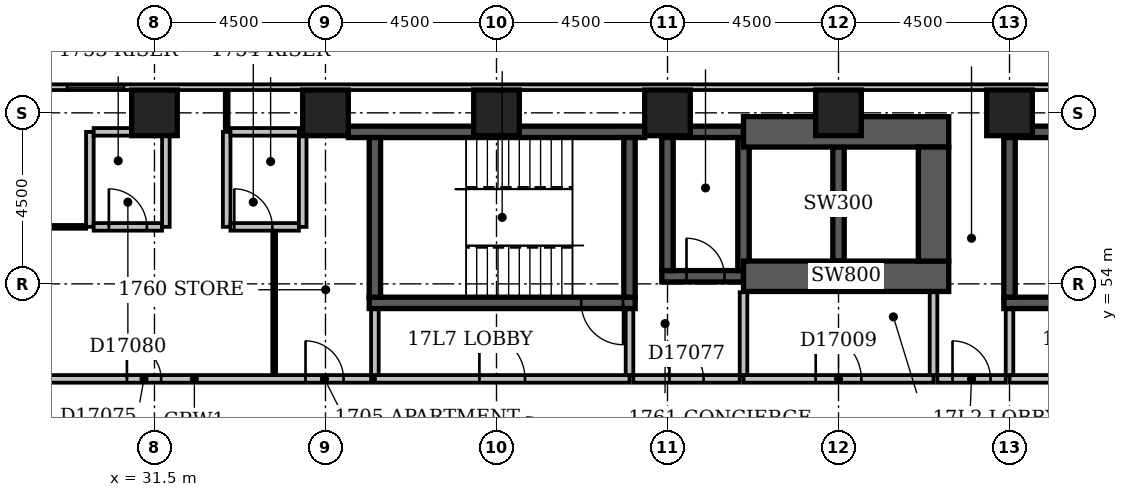
"""IFC4 building model, lengths in metres.
Left out: names, types, materials, properties, quantities, classifications, styles, units other than length and angle.
Written with IfcOpenShell. Run it as: python <this file> out.ifc"""

import sys

from ifc_helpers import new_model, si_unit, direction, frame, frame_2d, origin, origin_2d, place, context, subcontext, project, spatial, rectangle, extrude, element, fill, save


model = new_model("IFC4")
c1 = context("Model", 3, precision=1e-05, world=origin(), true_north=direction((0.0, 1.0)))
c2 = subcontext(c1, "Body", "Model", "MODEL_VIEW")
j1 = project(units=[si_unit("LENGTHUNIT", "METRE"), si_unit("PLANEANGLEUNIT", "RADIAN")], contexts=[c1])
p1 = place(None, origin())
s1 = spatial("IfcSite", under=j1, at=p1, CompositionType="ELEMENT")
p2 = place(p1, origin())
s2 = spatial("IfcBuilding", under=s1, at=p2, CompositionType="ELEMENT")
p3 = place(p2, frame((0.0, 0.0, 72.2)))
s3 = spatial("IfcBuildingStorey", under=s2, at=p3, CompositionType="ELEMENT", Elevation=72.2)
p4 = place(p3, frame((36.6, 58.0, -0.3), z_axis=(0.0, 0.0, 1.0), x_axis=(1.0, 0.0, 0.0)))
e1 = element("IfcWall", 1, at=p4, inside=s3, PredefinedType="SHEAR", context=c2, shape_type="SweptSolid", body=[
    extrude(rectangle(XDim=7.8, YDim=0.3, at=frame_2d((3.9, 0.0))), origin(), (0.0, 0.0, 1.0), 3.6),
])
p5 = place(p3, frame((37.15, 53.5, -0.3), z_axis=(0.0, 0.0, 1.0), x_axis=(1.0, 0.0, 0.0)))
e2 = element("IfcWall", 2, at=p5, inside=s3, PredefinedType="SHEAR", context=c2, shape_type="SweptSolid", body=[
    extrude(rectangle(XDim=7.0, YDim=0.3, at=frame_2d((3.5, 0.0))), origin(), (0.0, 0.0, 1.0), 3.6),
])
p6 = place(p5, frame((5.58, 0.0, 0.3)))
e3 = element("IfcOpeningElement", 3, at=p6, cuts=e2, PredefinedType="OPENING", context=c2, shape_type="SweptSolid", body=[
    extrude(rectangle(XDim=1.1, YDim=2.1, at=frame_2d((0.55, 1.05))), frame((0.0, 0.162, 0.0), z_axis=(0.0, -1.0, 0.0), x_axis=(1.0, 0.0, 0.0)), (0.0, 0.0, 1.0), 0.324),
])
for number, where, z_axis, x_axis in (
    (4, (37.3, 53.65, -0.3), (0.0, 0.0, 1.0), (0.0, 1.0, 0.0)),
    (5, (44.0, 53.65, -0.3), (0.0, 0.0, 1.0), (0.0, 1.0, 0.0)),
):
    element("IfcWall", number, at=place(p3, frame(where, z_axis=z_axis, x_axis=x_axis)), inside=s3, PredefinedType="SHEAR", context=c2, shape_type="SweptSolid", body=[
        extrude(rectangle(XDim=4.2, YDim=0.3, at=frame_2d((2.1, 0.0))), origin(), (0.0, 0.0, 1.0), 3.6),
    ])
p7 = place(p3, frame((44.85, 54.2, -0.3), z_axis=(0.0, 0.0, 1.0), x_axis=(1.0, 0.0, 0.0)))
e6 = element("IfcWall", 6, at=p7, inside=s3, PredefinedType="SHEAR", context=c2, shape_type="SweptSolid", body=[
    extrude(rectangle(XDim=2.15, YDim=0.3, at=frame_2d((1.075, 0.0))), origin(), (0.0, 0.0, 1.0), 3.6),
])
p8 = place(p7, frame((0.65, 0.0, 0.3)))
e7 = element("IfcOpeningElement", 7, at=p8, cuts=e6, PredefinedType="OPENING", context=c2, shape_type="SweptSolid", body=[
    extrude(rectangle(XDim=1.0, YDim=2.1, at=frame_2d((0.5, 1.05))), frame((0.0, 0.162, 0.0), z_axis=(0.0, -1.0, 0.0), x_axis=(1.0, 0.0, 0.0)), (0.0, 0.0, 1.0), 0.324),
])
p9 = place(p3, frame((44.85, 58.0, -0.3), z_axis=(0.0, 0.0, 1.0), x_axis=(1.0, 0.0, 0.0)))
e8 = element("IfcWall", 8, at=p9, inside=s3, PredefinedType="SHEAR", context=c2, shape_type="SweptSolid", body=[
    extrude(rectangle(XDim=2.15, YDim=0.3, at=frame_2d((1.075, 0.0))), origin(), (0.0, 0.0, 1.0), 3.6),
])
p10 = place(p3, frame((45.0, 54.35, -0.3), z_axis=(0.0, 0.0, 1.0), x_axis=(0.0, 1.0, 0.0)))
e9 = element("IfcWall", 9, at=p10, inside=s3, PredefinedType="SHEAR", context=c2, shape_type="SweptSolid", body=[
    extrude(rectangle(XDim=3.5, YDim=0.3, at=frame_2d((1.75, 0.0))), origin(), (0.0, 0.0, 1.0), 3.6),
])
p11 = place(p3, frame((47.0, 54.2, -0.3), z_axis=(0.0, 0.0, 1.0), x_axis=(1.0, 0.0, 0.0)))
e10 = element("IfcWall", 10, at=p11, inside=s3, PredefinedType="SHEAR", context=c2, shape_type="SweptSolid", body=[
    extrude(rectangle(XDim=5.4, YDim=0.8, at=frame_2d((2.7, 0.0))), origin(), (0.0, 0.0, 1.0), 3.6),
])
p12 = place(p3, frame((47.0, 54.35, -0.3), z_axis=(0.0, 0.0, 1.0), x_axis=(0.0, 1.0, 0.0)))
e11 = element("IfcWall", 11, at=p12, inside=s3, PredefinedType="SHEAR", context=c2, shape_type="SweptSolid", body=[
    extrude(rectangle(XDim=3.5, YDim=0.3, at=frame_2d((1.75, 0.0))), origin(), (0.0, 0.0, 1.0), 3.6),
])
p13 = place(p3, frame((47.0, 58.0, -0.3), z_axis=(0.0, 0.0, 1.0), x_axis=(1.0, 0.0, 0.0)))
e12 = element("IfcWall", 12, at=p13, inside=s3, PredefinedType="SHEAR", context=c2, shape_type="SweptSolid", body=[
    extrude(rectangle(XDim=5.4, YDim=0.8, at=frame_2d((2.7, 0.0))), origin(), (0.0, 0.0, 1.0), 3.6),
])
p14 = place(p3, frame((49.5, 54.6, -0.3), z_axis=(0.0, 0.0, 1.0), x_axis=(0.0, 1.0, 0.0)))
e13 = element("IfcWall", 13, at=p14, inside=s3, PredefinedType="SHEAR", context=c2, shape_type="SweptSolid", body=[
    extrude(rectangle(XDim=3.0, YDim=0.3, at=frame_2d((1.5, 0.0))), origin(), (0.0, 0.0, 1.0), 3.6),
])
p15 = place(p3, frame((52.0, 54.6, -0.3), z_axis=(0.0, 0.0, 1.0), x_axis=(0.0, 1.0, 0.0)))
e14 = element("IfcWall", 14, at=p15, inside=s3, PredefinedType="SHEAR", context=c2, shape_type="SweptSolid", body=[
    extrude(rectangle(XDim=3.0, YDim=0.8, at=frame_2d((1.5, 0.0))), origin(), (0.0, 0.0, 1.0), 3.6),
])
p16 = place(p3, frame((53.85, 53.5, -0.3), z_axis=(0.0, 0.0, 1.0), x_axis=(1.0, 0.0, 0.0)))
e15 = element("IfcWall", 15, at=p16, inside=s3, PredefinedType="SHEAR", context=c2, shape_type="SweptSolid", body=[
    extrude(rectangle(XDim=7.0, YDim=0.3, at=frame_2d((3.5, 0.0))), origin(), (0.0, 0.0, 1.0), 3.6),
])
p17 = place(p16, frame((5.58, 0.0, 0.3)))
e16 = element("IfcOpeningElement", 16, at=p17, cuts=e15, PredefinedType="OPENING", context=c2, shape_type="SweptSolid", body=[
    extrude(rectangle(XDim=1.1, YDim=2.1, at=frame_2d((0.55, 1.05))), frame((0.0, 0.162, 0.0), z_axis=(0.0, -1.0, 0.0), x_axis=(1.0, 0.0, 0.0)), (0.0, 0.0, 1.0), 0.324),
])
p18 = place(p3, frame((53.85, 58.0, -0.3), z_axis=(0.0, 0.0, 1.0), x_axis=(1.0, 0.0, 0.0)))
e17 = element("IfcWall", 17, at=p18, inside=s3, PredefinedType="SHEAR", context=c2, shape_type="SweptSolid", body=[
    extrude(rectangle(XDim=7.0, YDim=0.3, at=frame_2d((3.5, 0.0))), origin(), (0.0, 0.0, 1.0), 3.6),
])
p19 = place(p3, frame((54.0, 53.65, -0.3), z_axis=(0.0, 0.0, 1.0), x_axis=(0.0, 1.0, 0.0)))
e18 = element("IfcWall", 18, at=p19, inside=s3, PredefinedType="SHEAR", context=c2, shape_type="SweptSolid", body=[
    extrude(rectangle(XDim=4.2, YDim=0.3, at=frame_2d((2.1, 0.0))), origin(), (0.0, 0.0, 1.0), 3.6),
])
for number, where, z_axis, x_axis in (
    (19, (31.5, 58.5, -0.3), (0.0, 0.0, 1.0), (1.0, 0.0, 0.0)),
    (20, (36.0, 58.5, -0.3), (0.0, 0.0, 1.0), (1.0, 0.0, 0.0)),
    (21, (40.5, 58.5, -0.3), (0.0, 0.0, 1.0), (1.0, 0.0, 0.0)),
    (22, (45.0, 58.5, -0.3), (0.0, 0.0, 1.0), (1.0, 0.0, 0.0)),
    (23, (49.5, 58.5, -0.3), (0.0, 0.0, 1.0), (1.0, 0.0, 0.0)),
    (24, (54.0, 58.5, -0.3), (0.0, 0.0, 1.0), (1.0, 0.0, 0.0)),
):
    element("IfcColumn", number, at=place(p3, frame(where, z_axis=z_axis, x_axis=x_axis)), inside=s3, PredefinedType="COLUMN", context=c2, shape_type="SweptSolid", body=[
        extrude(rectangle(XDim=1.2, YDim=1.2, at=origin_2d()), origin(), (0.0, 0.0, 1.0), 3.6),
    ])
p20 = place(p3, frame((68.1, 59.175, 0.0), z_axis=(0.0, 0.0, 1.0), x_axis=(-1.0, 0.0, 0.0)))
e25 = element("IfcWall", 25, at=p20, inside=s3, PredefinedType="STANDARD", context=c2, shape_type="SweptSolid", body=[
    extrude(rectangle(XDim=68.85, YDim=0.15, at=frame_2d((34.425, 0.0))), origin(), (0.0, 0.0, 1.0), 2.7),
])
p21 = place(p20, frame((1.65, 0.0, 0.6)))
e26 = element("IfcOpeningElement", 26, at=p21, cuts=e25, PredefinedType="OPENING", context=c2, shape_type="SweptSolid", body=[
    extrude(rectangle(XDim=2.4, YDim=1.8, at=frame_2d((1.2, 0.9))), frame((0.0, 0.087, 0.0), z_axis=(0.0, -1.0, 0.0), x_axis=(1.0, 0.0, 0.0)), (0.0, 0.0, 1.0), 0.174),
])
p22 = place(p20, frame((6.15, 0.0, 0.6)))
e27 = element("IfcOpeningElement", 27, at=p22, cuts=e25, PredefinedType="OPENING", context=c2, shape_type="SweptSolid", body=[
    extrude(rectangle(XDim=2.4, YDim=1.8, at=frame_2d((1.2, 0.9))), frame((0.0, 0.087, 0.0), z_axis=(0.0, -1.0, 0.0), x_axis=(1.0, 0.0, 0.0)), (0.0, 0.0, 1.0), 0.174),
])
p23 = place(p20, frame((37.403, 0.0, 0.6)))
e28 = element("IfcOpeningElement", 28, at=p23, cuts=e25, PredefinedType="OPENING", context=c2, shape_type="SweptSolid", body=[
    extrude(rectangle(XDim=1.5, YDim=1.8, at=frame_2d((0.75, 0.9))), frame((0.0, 0.087, 0.0), z_axis=(0.0, -1.0, 0.0), x_axis=(1.0, 0.0, 0.0)), (0.0, 0.0, 1.0), 0.174),
])
p24 = place(p3, frame((47.0, 51.5, 0.0), z_axis=(0.0, 0.0, 1.0), x_axis=(1.0, 0.0, 0.0)))
e29 = element("IfcWall", 29, at=p24, inside=s3, PredefinedType="PARTITIONING", context=c2, shape_type="SweptSolid", body=[
    extrude(rectangle(XDim=5.0, YDim=0.2, at=frame_2d((2.5, 0.0))), origin(), (0.0, 0.0, 1.0), 3.3),
])
p25 = place(p24, frame((1.9, 0.0, 0.0)))
e30 = element("IfcOpeningElement", 30, at=p25, cuts=e29, PredefinedType="OPENING", context=c2, shape_type="SweptSolid", body=[
    extrude(rectangle(XDim=1.2, YDim=2.1, at=frame_2d((0.6, 1.05))), frame((0.0, 0.112, 0.0), z_axis=(0.0, -1.0, 0.0), x_axis=(1.0, 0.0, 0.0)), (0.0, 0.0, 1.0), 0.224),
])
for number, where, z_axis, x_axis in (
    (31, (52.0, 51.6, 0.0), (0.0, 0.0, 1.0), (0.0, 1.0, 0.0)),
    (32, (47.0, 51.6, 0.0), (0.0, 0.0, 1.0), (0.0, 1.0, 0.0)),
):
    element("IfcWall", number, at=place(p3, frame(where, z_axis=z_axis, x_axis=x_axis)), inside=s3, PredefinedType="PARTITIONING", context=c2, shape_type="SweptSolid", body=[
        extrude(rectangle(XDim=2.18, YDim=0.2, at=frame_2d((1.09, 0.0))), origin(), (0.0, 0.0, 1.0), 3.3),
    ])
p26 = place(p3, frame((37.3, 51.5, 0.0), z_axis=(0.0, 0.0, 1.0), x_axis=(1.0, 0.0, 0.0)))
e33 = element("IfcWall", 33, at=p26, inside=s3, PredefinedType="PARTITIONING", context=c2, shape_type="SweptSolid", body=[
    extrude(rectangle(XDim=6.7, YDim=0.2, at=frame_2d((3.35, 0.0))), origin(), (0.0, 0.0, 1.0), 3.3),
])
p27 = place(p26, frame((2.75, 0.0, 0.0)))
e34 = element("IfcOpeningElement", 34, at=p27, cuts=e33, PredefinedType="OPENING", context=c2, shape_type="SweptSolid", body=[
    extrude(rectangle(XDim=1.2, YDim=2.1, at=frame_2d((0.6, 1.05))), frame((0.0, 0.112, 0.0), z_axis=(0.0, -1.0, 0.0), x_axis=(1.0, 0.0, 0.0)), (0.0, 0.0, 1.0), 0.224),
])
for number, where, z_axis, x_axis in (
    (35, (44.0, 51.6, 0.0), (0.0, 0.0, 1.0), (0.0, 1.0, 0.0)),
    (36, (37.3, 51.6, 0.0), (0.0, 0.0, 1.0), (0.0, 1.0, 0.0)),
):
    element("IfcWall", number, at=place(p3, frame(where, z_axis=z_axis, x_axis=x_axis)), inside=s3, PredefinedType="PARTITIONING", context=c2, shape_type="SweptSolid", body=[
        extrude(rectangle(XDim=1.73, YDim=0.2, at=frame_2d((0.865, 0.0))), origin(), (0.0, 0.0, 1.0), 3.3),
    ])
p28 = place(p3, frame((54.0, 51.5, 0.0), z_axis=(0.0, 0.0, 1.0), x_axis=(1.0, 0.0, 0.0)))
e37 = element("IfcWall", 37, at=p28, inside=s3, PredefinedType="PARTITIONING", context=c2, shape_type="SweptSolid", body=[
    extrude(rectangle(XDim=6.7, YDim=0.2, at=frame_2d((3.35, 0.0))), origin(), (0.0, 0.0, 1.0), 3.3),
])
p29 = place(p28, frame((2.75, 0.0, 0.0)))
e38 = element("IfcOpeningElement", 38, at=p29, cuts=e37, PredefinedType="OPENING", context=c2, shape_type="SweptSolid", body=[
    extrude(rectangle(XDim=1.2, YDim=2.1, at=frame_2d((0.6, 1.05))), frame((0.0, 0.112, 0.0), z_axis=(0.0, -1.0, 0.0), x_axis=(1.0, 0.0, 0.0)), (0.0, 0.0, 1.0), 0.224),
])
p30 = place(p3, frame((54.0, 51.6, 0.0), z_axis=(0.0, 0.0, 1.0), x_axis=(0.0, 1.0, 0.0)))
e39 = element("IfcWall", 39, at=p30, inside=s3, PredefinedType="PARTITIONING", context=c2, shape_type="SweptSolid", body=[
    extrude(rectangle(XDim=1.73, YDim=0.2, at=frame_2d((0.865, 0.0))), origin(), (0.0, 0.0, 1.0), 2.6),
])
p31 = place(p3, frame((27.9, 51.5, 0.0), z_axis=(0.0, 0.0, 1.0), x_axis=(1.0, 0.0, 0.0)))
e40 = element("IfcWall", 40, at=p31, inside=s3, PredefinedType="PARTITIONING", context=c2, shape_type="SweptSolid", body=[
    extrude(rectangle(XDim=9.3, YDim=0.2, at=frame_2d((4.65, 0.0))), origin(), (0.0, 0.0, 1.0), 3.3),
])
p32 = place(p31, frame((2.875, 0.0, 0.0)))
e41 = element("IfcOpeningElement", 41, at=p32, cuts=e40, PredefinedType="OPENING", context=c2, shape_type="SweptSolid", body=[
    extrude(rectangle(XDim=0.9, YDim=2.1, at=frame_2d((0.45, 1.05))), frame((0.0, 0.112, 0.0), z_axis=(0.0, -1.0, 0.0), x_axis=(1.0, 0.0, 0.0)), (0.0, 0.0, 1.0), 0.224),
])
p33 = place(p31, frame((7.575, 0.0, 0.0)))
e42 = element("IfcOpeningElement", 42, at=p33, cuts=e40, PredefinedType="OPENING", context=c2, shape_type="SweptSolid", body=[
    extrude(rectangle(XDim=1.0, YDim=2.1, at=frame_2d((0.5, 1.05))), frame((0.0, 0.112, 0.0), z_axis=(0.0, -1.0, 0.0), x_axis=(1.0, 0.0, 0.0)), (0.0, 0.0, 1.0), 0.224),
])
p34 = place(p3, frame((44.1, 51.5, 0.0), z_axis=(0.0, 0.0, 1.0), x_axis=(1.0, 0.0, 0.0)))
e43 = element("IfcWall", 43, at=p34, inside=s3, PredefinedType="PARTITIONING", context=c2, shape_type="SweptSolid", body=[
    extrude(rectangle(XDim=2.8, YDim=0.2, at=frame_2d((1.4, 0.0))), origin(), (0.0, 0.0, 1.0), 3.3),
])
p35 = place(p34, frame((0.95, 0.0, 0.0)))
e44 = element("IfcOpeningElement", 44, at=p35, cuts=e43, PredefinedType="OPENING", context=c2, shape_type="SweptSolid", body=[
    extrude(rectangle(XDim=0.9, YDim=2.1, at=frame_2d((0.45, 1.05))), frame((0.0, 0.112, 0.0), z_axis=(0.0, -1.0, 0.0), x_axis=(1.0, 0.0, 0.0)), (0.0, 0.0, 1.0), 0.224),
])
p36 = place(p3, frame((52.1, 51.5, 0.0), z_axis=(0.0, 0.0, 1.0), x_axis=(1.0, 0.0, 0.0)))
e45 = element("IfcWall", 45, at=p36, inside=s3, PredefinedType="PARTITIONING", context=c2, shape_type="SweptSolid", body=[
    extrude(rectangle(XDim=1.8, YDim=0.2, at=frame_2d((0.9, 0.0))), origin(), (0.0, 0.0, 1.0), 3.3),
])
p37 = place(p36, frame((0.4, 0.0, 0.0)))
e46 = element("IfcOpeningElement", 46, at=p37, cuts=e45, PredefinedType="OPENING", context=c2, shape_type="SweptSolid", body=[
    extrude(rectangle(XDim=1.0, YDim=2.1, at=frame_2d((0.5, 1.05))), frame((0.0, 0.112, 0.0), z_axis=(0.0, -1.0, 0.0), x_axis=(1.0, 0.0, 0.0)), (0.0, 0.0, 1.0), 0.224),
])
p38 = place(p3, frame((34.65, 51.6, 0.0), z_axis=(0.0, 0.0, 1.0), x_axis=(0.0, 1.0, 0.0)))
e47 = element("IfcWall", 47, at=p38, inside=s3, PredefinedType="PARTITIONING", context=c2, shape_type="SweptSolid", body=[
    extrude(rectangle(XDim=3.8, YDim=0.1, at=frame_2d((1.9, 0.0))), origin(), (0.0, 0.0, 1.0), 3.3),
])
p39 = place(p3, frame((27.95, 55.5, 0.0), z_axis=(0.0, 0.0, 1.0), x_axis=(1.0, 0.0, 0.0)))
e48 = element("IfcWall", 48, at=p39, inside=s3, PredefinedType="PARTITIONING", context=c2, shape_type="SweptSolid", body=[
    extrude(rectangle(XDim=1.75, YDim=0.1, at=frame_2d((0.875, 0.0))), origin(), (0.0, 0.0, 1.0), 3.3),
])
p40 = place(p3, frame((29.8, 55.5, 0.0), z_axis=(0.0, 0.0, 1.0), x_axis=(0.0, 1.0, 0.0)))
e49 = element("IfcWall", 49, at=p40, inside=s3, PredefinedType="PARTITIONING", context=c2, shape_type="SweptSolid", body=[
    extrude(rectangle(XDim=2.5, YDim=0.2, at=frame_2d((1.25, 0.0))), origin(), (0.0, 0.0, 1.0), 3.3),
])
p41 = place(p3, frame((29.9, 55.5, 0.0), z_axis=(0.0, 0.0, 1.0), x_axis=(1.0, 0.0, 0.0)))
e50 = element("IfcWall", 50, at=p41, inside=s3, PredefinedType="PARTITIONING", context=c2, shape_type="SweptSolid", body=[
    extrude(rectangle(XDim=1.8, YDim=0.2, at=frame_2d((0.9, 0.0))), origin(), (0.0, 0.0, 1.0), 3.3),
])
p42 = place(p41, frame((0.4, 0.0, 0.0)))
e51 = element("IfcOpeningElement", 51, at=p42, cuts=e50, PredefinedType="OPENING", context=c2, shape_type="SweptSolid", body=[
    extrude(rectangle(XDim=1.0, YDim=2.1, at=frame_2d((0.5, 1.05))), frame((0.0, 0.112, 0.0), z_axis=(0.0, -1.0, 0.0), x_axis=(1.0, 0.0, 0.0)), (0.0, 0.0, 1.0), 0.224),
])
for number, where, z_axis, x_axis in (
    (52, (31.8, 55.5, 0.0), (0.0, 0.0, 1.0), (0.0, 1.0, 0.0)),
    (53, (33.4, 55.5, 0.0), (0.0, 0.0, 1.0), (0.0, 1.0, 0.0)),
):
    element("IfcWall", number, at=place(p3, frame(where, z_axis=z_axis, x_axis=x_axis)), inside=s3, PredefinedType="PARTITIONING", context=c2, shape_type="SweptSolid", body=[
        extrude(rectangle(XDim=2.5, YDim=0.2, at=frame_2d((1.25, 0.0))), origin(), (0.0, 0.0, 1.0), 3.3),
    ])
p43 = place(p3, frame((33.5, 55.5, 0.0), z_axis=(0.0, 0.0, 1.0), x_axis=(1.0, 0.0, 0.0)))
e54 = element("IfcWall", 54, at=p43, inside=s3, PredefinedType="PARTITIONING", context=c2, shape_type="SweptSolid", body=[
    extrude(rectangle(XDim=1.8, YDim=0.2, at=frame_2d((0.9, 0.0))), origin(), (0.0, 0.0, 1.0), 3.3),
])
p44 = place(p43, frame((0.1, 0.0, 0.0)))
e55 = element("IfcOpeningElement", 55, at=p44, cuts=e54, PredefinedType="OPENING", context=c2, shape_type="SweptSolid", body=[
    extrude(rectangle(XDim=1.0, YDim=2.1, at=frame_2d((0.5, 1.05))), frame((0.0, 0.112, 0.0), z_axis=(0.0, -1.0, 0.0), x_axis=(1.0, 0.0, 0.0)), (0.0, 0.0, 1.0), 0.224),
])
p45 = place(p3, frame((35.4, 55.5, 0.0), z_axis=(0.0, 0.0, 1.0), x_axis=(0.0, 1.0, 0.0)))
e56 = element("IfcWall", 56, at=p45, inside=s3, PredefinedType="PARTITIONING", context=c2, shape_type="SweptSolid", body=[
    extrude(rectangle(XDim=2.5, YDim=0.2, at=frame_2d((1.25, 0.0))), origin(), (0.0, 0.0, 1.0), 2.4),
])
p46 = place(p3, frame((29.9, 58.0, 0.0), z_axis=(0.0, 0.0, 1.0), x_axis=(1.0, 0.0, 0.0)))
e57 = element("IfcWall", 57, at=p46, inside=s3, PredefinedType="PARTITIONING", context=c2, shape_type="SweptSolid", body=[
    extrude(rectangle(XDim=1.8, YDim=0.2, at=frame_2d((0.9, 0.0))), origin(), (0.0, 0.0, 1.0), 3.3),
])
p47 = place(p3, frame((33.4, 58.0, 0.0), z_axis=(0.0, 0.0, 1.0), x_axis=(0.0, 1.0, 0.0)))
e58 = element("IfcWall", 58, at=p47, inside=s3, PredefinedType="PARTITIONING", context=c2, shape_type="SweptSolid", body=[
    extrude(rectangle(XDim=1.1, YDim=0.1, at=frame_2d((0.55, 0.0))), origin(), (0.0, 0.0, 1.0), 3.3),
])
p48 = place(p3, frame((33.5, 58.0, 0.0), z_axis=(0.0, 0.0, 1.0), x_axis=(1.0, 0.0, 0.0)))
e59 = element("IfcWall", 59, at=p48, inside=s3, PredefinedType="PARTITIONING", context=c2, shape_type="SweptSolid", body=[
    extrude(rectangle(XDim=1.8, YDim=0.2, at=frame_2d((0.9, 0.0))), origin(), (0.0, 0.0, 1.0), 3.3),
])
p49 = place(p23, origin())
e60 = element("IfcWindow", 60, at=p49, inside=s3, PartitioningType="SINGLE_PANEL", PredefinedType="WINDOW", context=c2, shape_type="SweptSolid", body=[
    extrude(rectangle(XDim=1.5, YDim=1.8, at=frame_2d((0.75, 0.9))), frame((0.0, 0.03, 0.0), z_axis=(0.0, -1.0, 0.0), x_axis=(1.0, 0.0, 0.0)), (0.0, 0.0, 1.0), 0.06),
])
fill(e28, e60)
p50 = place(p27, origin())
e61 = element("IfcDoor", 61, at=p50, inside=s3, OperationType="SINGLE_SWING_LEFT", PredefinedType="DOOR", context=c2, shape_type="SweptSolid", body=[
    extrude(rectangle(XDim=1.2, YDim=2.1, at=frame_2d((0.6, 1.05))), frame((0.0, 0.025, 0.0), z_axis=(0.0, -1.0, 0.0), x_axis=(1.0, 0.0, 0.0)), (0.0, 0.0, 1.0), 0.05),
])
fill(e34, e61)
p51 = place(p25, origin())
e62 = element("IfcDoor", 62, at=p51, inside=s3, OperationType="SINGLE_SWING_LEFT", PredefinedType="DOOR", context=c2, shape_type="SweptSolid", body=[
    extrude(rectangle(XDim=1.2, YDim=2.1, at=frame_2d((0.6, 1.05))), frame((0.0, 0.025, 0.0), z_axis=(0.0, -1.0, 0.0), x_axis=(1.0, 0.0, 0.0)), (0.0, 0.0, 1.0), 0.05),
])
fill(e30, e62)
p52 = place(p8, origin())
e63 = element("IfcDoor", 63, at=p52, inside=s3, OperationType="SINGLE_SWING_LEFT", PredefinedType="DOOR", context=c2, shape_type="SweptSolid", body=[
    extrude(rectangle(XDim=1.0, YDim=2.1, at=frame_2d((0.5, 1.05))), frame((0.0, 0.025, 0.0), z_axis=(0.0, -1.0, 0.0), x_axis=(1.0, 0.0, 0.0)), (0.0, 0.0, 1.0), 0.05),
])
fill(e7, e63)
p53 = place(p6, origin())
e64 = element("IfcDoor", 64, at=p53, inside=s3, OperationType="SINGLE_SWING_RIGHT", PredefinedType="DOOR", context=c2, shape_type="SweptSolid", body=[
    extrude(rectangle(XDim=1.1, YDim=2.1, at=frame_2d((0.55, 1.05))), frame((0.0, 0.025, 0.0), z_axis=(0.0, -1.0, 0.0), x_axis=(1.0, 0.0, 0.0)), (0.0, 0.0, 1.0), 0.05),
])
fill(e3, e64)
p54 = place(p32, origin())
e65 = element("IfcDoor", 65, at=p54, inside=s3, OperationType="SINGLE_SWING_LEFT", PredefinedType="DOOR", context=c2, shape_type="SweptSolid", body=[
    extrude(rectangle(XDim=0.9, YDim=2.1, at=frame_2d((0.45, 1.05))), frame((0.0, 0.025, 0.0), z_axis=(0.0, -1.0, 0.0), x_axis=(1.0, 0.0, 0.0)), (0.0, 0.0, 1.0), 0.05),
])
fill(e41, e65)
p55 = place(p33, origin())
e66 = element("IfcDoor", 66, at=p55, inside=s3, OperationType="SINGLE_SWING_LEFT", PredefinedType="DOOR", context=c2, shape_type="SweptSolid", body=[
    extrude(rectangle(XDim=1.0, YDim=2.1, at=frame_2d((0.5, 1.05))), frame((0.0, 0.025, 0.0), z_axis=(0.0, -1.0, 0.0), x_axis=(1.0, 0.0, 0.0)), (0.0, 0.0, 1.0), 0.05),
])
fill(e42, e66)
p56 = place(p35, origin())
e67 = element("IfcDoor", 67, at=p56, inside=s3, OperationType="SINGLE_SWING_LEFT", PredefinedType="DOOR", context=c2, shape_type="SweptSolid", body=[
    extrude(rectangle(XDim=0.9, YDim=2.1, at=frame_2d((0.45, 1.05))), frame((0.0, 0.025, 0.0), z_axis=(0.0, -1.0, 0.0), x_axis=(1.0, 0.0, 0.0)), (0.0, 0.0, 1.0), 0.05),
])
fill(e44, e67)
p57 = place(p37, origin())
e68 = element("IfcDoor", 68, at=p57, inside=s3, OperationType="SINGLE_SWING_LEFT", PredefinedType="DOOR", context=c2, shape_type="SweptSolid", body=[
    extrude(rectangle(XDim=1.0, YDim=2.1, at=frame_2d((0.5, 1.05))), frame((0.0, 0.025, 0.0), z_axis=(0.0, -1.0, 0.0), x_axis=(1.0, 0.0, 0.0)), (0.0, 0.0, 1.0), 0.05),
])
fill(e46, e68)
p58 = place(p42, origin())
e69 = element("IfcDoor", 69, at=p58, inside=s3, OperationType="SINGLE_SWING_LEFT", PredefinedType="DOOR", context=c2, shape_type="SweptSolid", body=[
    extrude(rectangle(XDim=1.0, YDim=2.1, at=frame_2d((0.5, 1.05))), frame((0.0, 0.025, 0.0), z_axis=(0.0, -1.0, 0.0), x_axis=(1.0, 0.0, 0.0)), (0.0, 0.0, 1.0), 0.05),
])
fill(e51, e69)
p59 = place(p44, origin())
e70 = element("IfcDoor", 70, at=p59, inside=s3, OperationType="SINGLE_SWING_LEFT", PredefinedType="DOOR", context=c2, shape_type="SweptSolid", body=[
    extrude(rectangle(XDim=1.0, YDim=2.1, at=frame_2d((0.5, 1.05))), frame((0.0, 0.025, 0.0), z_axis=(0.0, -1.0, 0.0), x_axis=(1.0, 0.0, 0.0)), (0.0, 0.0, 1.0), 0.05),
])
fill(e55, e70)
save(model, sys.argv[1])
